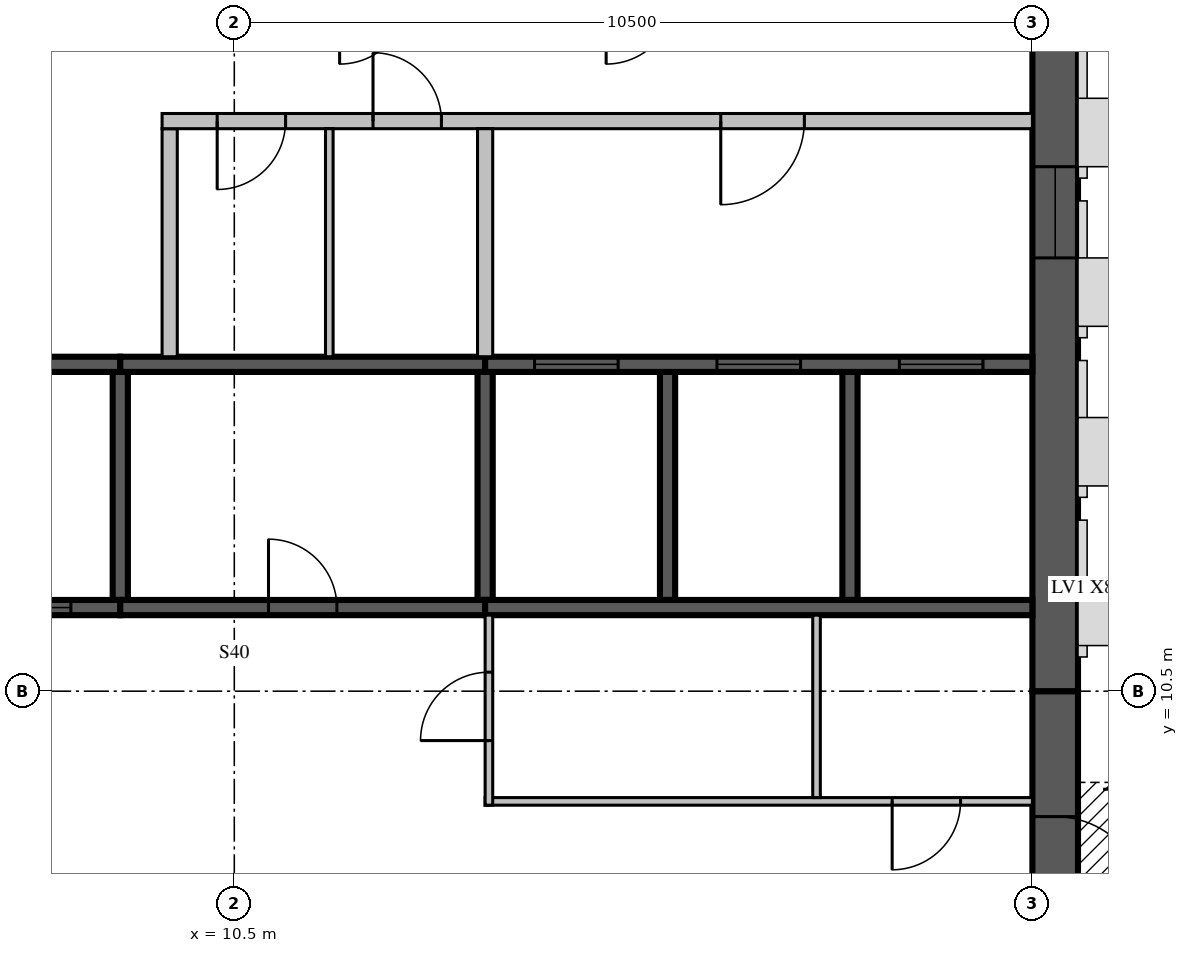
"""IFC4 building model, lengths in metres.
Left out: names, types, materials, properties, quantities, classifications, styles, units other than length and angle.
Written with IfcOpenShell. Run it as: python <this file> out.ifc"""

import sys

from ifc_helpers import new_model, si_unit, direction, frame, frame_2d, origin, place, context, subcontext, project, spatial, rectangle, extrude, source, transform, mapped, element, fill, save


model = new_model("IFC4")
c1 = context("Model", 3, precision=1e-05, world=origin(), true_north=direction((0.0, 1.0)))
c2 = subcontext(c1, "Body", "Model", "MODEL_VIEW")
j1 = project(units=[si_unit("LENGTHUNIT", "METRE"), si_unit("PLANEANGLEUNIT", "RADIAN")], contexts=[c1])
p1 = place(None, origin())
s1 = spatial("IfcSite", under=j1, at=p1, CompositionType="ELEMENT")
p2 = place(p1, origin())
s2 = spatial("IfcBuilding", under=s1, at=p2, CompositionType="ELEMENT")
p3 = place(p2, frame((0.0, 0.0, 305.5)))
s3 = spatial("IfcBuildingStorey", under=s2, at=p3, CompositionType="ELEMENT", Elevation=305.5)
m1 = source(origin(), c2, "Body", "SweptSolid", [
    extrude(rectangle(XDim=6.3, YDim=0.6, at=frame_2d((3.15, 0.0))), origin(), (0.0, 0.0, 1.0), 3.5),
])
p4 = place(p3, frame((21.3, 4.2, 0.0), z_axis=(0.0, 0.0, 1.0), x_axis=(0.0, 1.0, 0.0)))
e1 = element("IfcWall", 1, at=p4, inside=s3, PredefinedType="SHEAR", context=c2, shape_type="MappedRepresentation", body=[
    mapped(m1, transform((0.0, 0.0, 0.0), scale=1.0)),
])
m2 = source(origin(), c2, "Body", "SweptSolid", [
    extrude(rectangle(XDim=1.2, YDim=2.1, at=frame_2d((0.6, 1.05))), frame((0.0, 0.31, 0.0), z_axis=(0.0, -1.0, 0.0), x_axis=(1.0, 0.0, 0.0)), (0.0, 0.0, 1.0), 0.62),
])
p5 = place(p4, frame((3.45, 0.0, 0.0)))
e2 = element("IfcOpeningElement", 2, at=p5, cuts=e1, PredefinedType="OPENING", context=c2, shape_type="MappedRepresentation", body=[
    mapped(m2, transform((0.0, 0.0, 0.0), scale=1.0)),
])
m3 = source(origin(), c2, "Body", "SweptSolid", [
    extrude(rectangle(XDim=10.5, YDim=0.6, at=frame_2d((5.25, 0.0))), origin(), (0.0, 0.0, 1.0), 3.5),
])
p6 = place(p3, frame((21.3, 10.5, 0.0), z_axis=(0.0, 0.0, 1.0), x_axis=(0.0, 1.0, 0.0)))
e3 = element("IfcWall", 3, at=p6, inside=s3, PredefinedType="SHEAR", context=c2, shape_type="MappedRepresentation", body=[
    mapped(m3, transform((0.0, 0.0, 0.0), scale=1.0)),
])
m4 = source(origin(), c2, "Body", "SweptSolid", [
    extrude(rectangle(XDim=1.2, YDim=2.4, at=frame_2d((0.6, 1.2))), frame((0.0, 0.31, 0.0), z_axis=(0.0, -1.0, 0.0), x_axis=(1.0, 0.0, 0.0)), (0.0, 0.0, 1.0), 0.62),
])
p7 = place(p6, frame((5.7, 0.0, 0.6)))
e4 = element("IfcOpeningElement", 4, at=p7, cuts=e3, PredefinedType="OPENING", context=c2, shape_type="MappedRepresentation", body=[
    mapped(m4, transform((0.0, 0.0, 0.0), scale=1.0)),
])
m5 = source(origin(), c2, "Body", "SweptSolid", [
    extrude(rectangle(XDim=3.0, YDim=0.2, at=frame_2d((1.5, 0.0))), origin(), (0.0, 0.0, 1.0), 3.1),
])
for number, where, z_axis, x_axis in (
    (5, (9.0, 11.7, 0.0), (0.0, 0.0, 1.0), (0.0, 1.0, 0.0)),
    (6, (13.8, 11.7, 0.0), (0.0, 0.0, 1.0), (0.0, 1.0, 0.0)),
):
    element("IfcWall", number, at=place(p3, frame(where, z_axis=z_axis, x_axis=x_axis)), inside=s3, PredefinedType="SOLIDWALL", context=c2, shape_type="MappedRepresentation", body=[
        mapped(m5, transform((0.0, 0.0, 0.0), scale=1.0)),
    ])
m6 = source(origin(), c2, "Body", "SweptSolid", [
    extrude(rectangle(XDim=3.0, YDim=0.2, at=frame_2d((1.5, 0.0))), origin(), (0.0, 0.0, 1.0), 3.5),
])
for number, where, z_axis, x_axis in (
    (7, (16.2, 11.7, 0.0), (0.0, 0.0, 1.0), (0.0, 1.0, 0.0)),
    (8, (18.6, 11.7, 0.0), (0.0, 0.0, 1.0), (0.0, 1.0, 0.0)),
):
    element("IfcWall", number, at=place(p3, frame(where, z_axis=z_axis, x_axis=x_axis)), inside=s3, PredefinedType="SOLIDWALL", context=c2, shape_type="MappedRepresentation", body=[
        mapped(m6, transform((0.0, 0.0, 0.0), scale=1.0)),
    ])
m7 = source(origin(), c2, "Body", "SweptSolid", [
    extrude(rectangle(XDim=4.8, YDim=0.2, at=frame_2d((2.4, 0.0))), origin(), (0.0, 0.0, 1.0), 3.5),
])
p8 = place(p3, frame((4.2, 11.6, 0.0), z_axis=(0.0, 0.0, 1.0), x_axis=(1.0, 0.0, 0.0)))
e9 = element("IfcWall", 9, at=p8, inside=s3, PredefinedType="SOLIDWALL", context=c2, shape_type="MappedRepresentation", body=[
    mapped(m7, transform((0.0, 0.0, 0.0), scale=1.0)),
])
m8 = source(origin(), c2, "Body", "SweptSolid", [
    extrude(rectangle(XDim=1.1, YDim=2.1, at=frame_2d((0.55, 1.05))), frame((0.0, 0.11, 0.0), z_axis=(0.0, -1.0, 0.0), x_axis=(1.0, 0.0, 0.0)), (0.0, 0.0, 1.0), 0.22),
])
p9 = place(p8, frame((0.65, 0.0, 0.0)))
e10 = element("IfcOpeningElement", 10, at=p9, cuts=e9, PredefinedType="OPENING", context=c2, shape_type="MappedRepresentation", body=[
    mapped(m8, transform((0.0, 0.0, 0.0), scale=1.0)),
])
p10 = place(p8, frame((3.05, 0.0, 0.0)))
e11 = element("IfcOpeningElement", 11, at=p10, cuts=e9, PredefinedType="OPENING", context=c2, shape_type="MappedRepresentation", body=[
    mapped(m8, transform((0.0, 0.0, 0.0), scale=1.0)),
])
m9 = source(origin(), c2, "Body", "SweptSolid", [
    extrude(rectangle(XDim=4.8, YDim=0.2, at=frame_2d((2.4, 0.0))), origin(), (0.0, 0.0, 1.0), 3.1),
])
p11 = place(p3, frame((9.0, 11.6, 0.0), z_axis=(0.0, 0.0, 1.0), x_axis=(1.0, 0.0, 0.0)))
e12 = element("IfcWall", 12, at=p11, inside=s3, PredefinedType="SOLIDWALL", context=c2, shape_type="MappedRepresentation", body=[
    mapped(m9, transform((0.0, 0.0, 0.0), scale=1.0)),
])
m10 = source(origin(), c2, "Body", "SweptSolid", [
    extrude(rectangle(XDim=0.9, YDim=2.1, at=frame_2d((0.45, 1.05))), frame((0.0, 0.11, 0.0), z_axis=(0.0, -1.0, 0.0), x_axis=(1.0, 0.0, 0.0)), (0.0, 0.0, 1.0), 0.22),
])
p12 = place(p11, frame((1.95, 0.0, 0.0)))
e13 = element("IfcOpeningElement", 13, at=p12, cuts=e12, PredefinedType="OPENING", context=c2, shape_type="MappedRepresentation", body=[
    mapped(m10, transform((0.0, 0.0, 0.0), scale=1.0)),
])
m11 = source(origin(), c2, "Body", "SweptSolid", [
    extrude(rectangle(XDim=7.2, YDim=0.2, at=frame_2d((3.6, 0.0))), origin(), (0.0, 0.0, 1.0), 3.5),
])
p13 = place(p3, frame((13.8, 11.6, 0.0), z_axis=(0.0, 0.0, 1.0), x_axis=(1.0, 0.0, 0.0)))
e14 = element("IfcWall", 14, at=p13, inside=s3, PredefinedType="SOLIDWALL", context=c2, shape_type="MappedRepresentation", body=[
    mapped(m11, transform((0.0, 0.0, 0.0), scale=1.0)),
])
p14 = place(p3, frame((4.2, 14.8, 0.0), z_axis=(0.0, 0.0, 1.0), x_axis=(1.0, 0.0, 0.0)))
e15 = element("IfcWall", 15, at=p14, inside=s3, PredefinedType="SOLIDWALL", context=c2, shape_type="MappedRepresentation", body=[
    mapped(m7, transform((0.0, 0.0, 0.0), scale=1.0)),
])
p15 = place(p3, frame((9.0, 14.8, 0.0), z_axis=(0.0, 0.0, 1.0), x_axis=(1.0, 0.0, 0.0)))
e16 = element("IfcWall", 16, at=p15, inside=s3, PredefinedType="SOLIDWALL", context=c2, shape_type="MappedRepresentation", body=[
    mapped(m9, transform((0.0, 0.0, 0.0), scale=1.0)),
])
p16 = place(p3, frame((13.8, 14.8, 0.0), z_axis=(0.0, 0.0, 1.0), x_axis=(1.0, 0.0, 0.0)))
e17 = element("IfcWall", 17, at=p16, inside=s3, PredefinedType="SOLIDWALL", context=c2, shape_type="MappedRepresentation", body=[
    mapped(m11, transform((0.0, 0.0, 0.0), scale=1.0)),
])
p17 = place(p16, frame((0.65, 0.0, 0.0)))
e18 = element("IfcOpeningElement", 18, at=p17, cuts=e17, PredefinedType="OPENING", context=c2, shape_type="MappedRepresentation", body=[
    mapped(m8, transform((0.0, 0.0, 0.0), scale=1.0)),
])
p18 = place(p16, frame((3.05, 0.0, 0.0)))
e19 = element("IfcOpeningElement", 19, at=p18, cuts=e17, PredefinedType="OPENING", context=c2, shape_type="MappedRepresentation", body=[
    mapped(m8, transform((0.0, 0.0, 0.0), scale=1.0)),
])
p19 = place(p16, frame((5.45, 0.0, 0.0)))
e20 = element("IfcOpeningElement", 20, at=p19, cuts=e17, PredefinedType="OPENING", context=c2, shape_type="MappedRepresentation", body=[
    mapped(m8, transform((0.0, 0.0, 0.0), scale=1.0)),
])
m12 = source(origin(), c2, "Body", "SweptSolid", [
    extrude(rectangle(XDim=3.0, YDim=0.2, at=frame_2d((1.5, 0.0))), origin(), (0.0, 0.0, 1.0), 3.1),
])
p20 = place(p3, frame((9.65, 14.9, 0.0), z_axis=(0.0, 0.0, 1.0), x_axis=(0.0, 1.0, 0.0)))
e21 = element("IfcWall", 21, at=p20, inside=s3, PredefinedType="PARTITIONING", context=c2, shape_type="MappedRepresentation", body=[
    mapped(m12, transform((0.0, 0.0, 0.0), scale=1.0)),
])
m13 = source(origin(), c2, "Body", "SweptSolid", [
    extrude(rectangle(XDim=11.45, YDim=0.2, at=frame_2d((5.725, 0.0))), origin(), (0.0, 0.0, 1.0), 3.1),
])
p21 = place(p3, frame((9.55, 18.0, 0.0), z_axis=(0.0, 0.0, 1.0), x_axis=(1.0, 0.0, 0.0)))
e22 = element("IfcWall", 22, at=p21, inside=s3, PredefinedType="PARTITIONING", context=c2, shape_type="MappedRepresentation", body=[
    mapped(m13, transform((0.0, 0.0, 0.0), scale=1.0)),
])
p22 = place(p21, frame((0.725, 0.0, 0.0)))
e23 = element("IfcOpeningElement", 23, at=p22, cuts=e22, PredefinedType="OPENING", context=c2, shape_type="MappedRepresentation", body=[
    mapped(m10, transform((0.0, 0.0, 0.0), scale=1.0)),
])
p23 = place(p21, frame((2.775, 0.0, 0.0)))
e24 = element("IfcOpeningElement", 24, at=p23, cuts=e22, PredefinedType="OPENING", context=c2, shape_type="MappedRepresentation", body=[
    mapped(m10, transform((0.0, 0.0, 0.0), scale=1.0)),
])
p24 = place(p21, frame((7.35, 0.0, 0.0)))
e25 = element("IfcOpeningElement", 25, at=p24, cuts=e22, PredefinedType="OPENING", context=c2, shape_type="MappedRepresentation", body=[
    mapped(m8, transform((0.0, 0.0, 0.0), scale=1.0)),
])
m14 = source(origin(), c2, "Body", "SweptSolid", [
    extrude(rectangle(XDim=7.2, YDim=0.1, at=frame_2d((3.6, 0.0))), origin(), (0.0, 0.0, 1.0), 3.1),
])
p25 = place(p3, frame((13.8, 9.05, 0.0), z_axis=(0.0, 0.0, 1.0), x_axis=(1.0, 0.0, 0.0)))
e26 = element("IfcWall", 26, at=p25, inside=s3, PredefinedType="PARTITIONING", context=c2, shape_type="MappedRepresentation", body=[
    mapped(m14, transform((0.0, 0.0, 0.0), scale=1.0)),
])
m15 = source(origin(), c2, "Body", "SweptSolid", [
    extrude(rectangle(XDim=0.9, YDim=2.1, at=frame_2d((0.45, 1.05))), frame((0.0, 0.06, 0.0), z_axis=(0.0, -1.0, 0.0), x_axis=(1.0, 0.0, 0.0)), (0.0, 0.0, 1.0), 0.12),
])
p26 = place(p25, frame((5.355, 0.0, 0.0)))
e27 = element("IfcOpeningElement", 27, at=p26, cuts=e26, PredefinedType="OPENING", context=c2, shape_type="MappedRepresentation", body=[
    mapped(m15, transform((0.0, 0.0, 0.0), scale=1.0)),
])
m16 = source(origin(), c2, "Body", "SweptSolid", [
    extrude(rectangle(XDim=2.5, YDim=0.1, at=frame_2d((1.25, 0.0))), origin(), (0.0, 0.0, 1.0), 3.1),
])
p27 = place(p3, frame((13.85, 9.0, 0.0), z_axis=(0.0, 0.0, 1.0), x_axis=(0.0, 1.0, 0.0)))
e28 = element("IfcWall", 28, at=p27, inside=s3, PredefinedType="PARTITIONING", context=c2, shape_type="MappedRepresentation", body=[
    mapped(m16, transform((0.0, 0.0, 0.0), scale=1.0)),
])
p28 = place(p27, frame((0.85, 0.0, 0.0)))
e29 = element("IfcOpeningElement", 29, at=p28, cuts=e28, PredefinedType="OPENING", context=c2, shape_type="MappedRepresentation", body=[
    mapped(m15, transform((0.0, 0.0, 0.0), scale=1.0)),
])
m17 = source(origin(), c2, "Body", "SweptSolid", [
    extrude(rectangle(XDim=2.4, YDim=0.1, at=frame_2d((1.2, 0.0))), origin(), (0.0, 0.0, 1.0), 3.1),
])
p29 = place(p3, frame((18.16, 9.1, 0.0), z_axis=(0.0, 0.0, 1.0), x_axis=(0.0, 1.0, 0.0)))
e30 = element("IfcWall", 30, at=p29, inside=s3, PredefinedType="PARTITIONING", context=c2, shape_type="MappedRepresentation", body=[
    mapped(m17, transform((0.0, 0.0, 0.0), scale=1.0)),
])
p30 = place(p3, frame((13.8, 14.9, 0.0), z_axis=(0.0, 0.0, 1.0), x_axis=(0.0, 1.0, 0.0)))
e31 = element("IfcWall", 31, at=p30, inside=s3, PredefinedType="PARTITIONING", context=c2, shape_type="MappedRepresentation", body=[
    mapped(m12, transform((0.0, 0.0, 0.0), scale=1.0)),
])
m18 = source(origin(), c2, "Body", "SweptSolid", [
    extrude(rectangle(XDim=3.0, YDim=0.1, at=frame_2d((1.5, 0.0))), origin(), (0.0, 0.0, 1.0), 3.1),
])
p31 = place(p3, frame((11.75, 14.9, 0.0), z_axis=(0.0, 0.0, 1.0), x_axis=(0.0, 1.0, 0.0)))
e32 = element("IfcWall", 32, at=p31, inside=s3, PredefinedType="PARTITIONING", context=c2, shape_type="MappedRepresentation", body=[
    mapped(m18, transform((0.0, 0.0, 0.0), scale=1.0)),
])
m19 = source(origin(), c2, "Body", "SweptSolid", [
    extrude(rectangle(XDim=1.1, YDim=2.1, at=frame_2d((0.55, 1.05))), frame((0.0, 0.025, 0.0), z_axis=(0.0, -1.0, 0.0), x_axis=(1.0, 0.0, 0.0)), (0.0, 0.0, 1.0), 0.05),
])
p32 = place(p10, origin())
e33 = element("IfcDoor", 33, at=p32, inside=s3, OperationType="SLIDING_TO_LEFT", PredefinedType="DOOR", context=c2, shape_type="MappedRepresentation", body=[
    mapped(m19, transform((0.0, 0.0, 0.0), scale=1.0)),
])
fill(e11, e33)
m20 = source(origin(), c2, "Body", "SweptSolid", [
    extrude(rectangle(XDim=0.9, YDim=2.1, at=frame_2d((0.45, 1.05))), frame((0.0, 0.025, 0.0), z_axis=(0.0, -1.0, 0.0), x_axis=(1.0, 0.0, 0.0)), (0.0, 0.0, 1.0), 0.05),
])
p33 = place(p12, origin())
e34 = element("IfcDoor", 34, at=p33, inside=s3, OperationType="SINGLE_SWING_LEFT", PredefinedType="DOOR", context=c2, shape_type="MappedRepresentation", body=[
    mapped(m20, transform((0.0, 0.0, 0.0), scale=1.0)),
])
fill(e13, e34)
p34 = place(p17, origin())
e35 = element("IfcDoor", 35, at=p34, inside=s3, OperationType="SLIDING_TO_LEFT", PredefinedType="DOOR", context=c2, shape_type="MappedRepresentation", body=[
    mapped(m19, transform((0.0, 0.0, 0.0), scale=1.0)),
])
fill(e18, e35)
p35 = place(p18, origin())
e36 = element("IfcDoor", 36, at=p35, inside=s3, OperationType="SLIDING_TO_LEFT", PredefinedType="DOOR", context=c2, shape_type="MappedRepresentation", body=[
    mapped(m19, transform((0.0, 0.0, 0.0), scale=1.0)),
])
fill(e19, e36)
p36 = place(p19, origin())
e37 = element("IfcDoor", 37, at=p36, inside=s3, OperationType="SLIDING_TO_LEFT", PredefinedType="DOOR", context=c2, shape_type="MappedRepresentation", body=[
    mapped(m19, transform((0.0, 0.0, 0.0), scale=1.0)),
])
fill(e20, e37)
p37 = place(p22, origin())
e38 = element("IfcDoor", 38, at=p37, inside=s3, OperationType="SINGLE_SWING_RIGHT", PredefinedType="DOOR", context=c2, shape_type="MappedRepresentation", body=[
    mapped(m20, transform((0.0, 0.0, 0.0), scale=1.0)),
])
fill(e23, e38)
p38 = place(p23, origin())
e39 = element("IfcDoor", 39, at=p38, inside=s3, OperationType="SINGLE_SWING_LEFT", PredefinedType="DOOR", context=c2, shape_type="MappedRepresentation", body=[
    mapped(m20, transform((0.0, 0.0, 0.0), scale=1.0)),
])
fill(e24, e39)
p39 = place(p24, origin())
e40 = element("IfcDoor", 40, at=p39, inside=s3, OperationType="SINGLE_SWING_RIGHT", PredefinedType="DOOR", context=c2, shape_type="MappedRepresentation", body=[
    mapped(m19, transform((0.0, 0.0, 0.0), scale=1.0)),
])
fill(e25, e40)
p40 = place(p26, origin())
e41 = element("IfcDoor", 41, at=p40, inside=s3, OperationType="SINGLE_SWING_RIGHT", PredefinedType="DOOR", context=c2, shape_type="MappedRepresentation", body=[
    mapped(m20, transform((0.0, 0.0, 0.0), scale=1.0)),
])
fill(e27, e41)
p41 = place(p28, origin())
e42 = element("IfcDoor", 42, at=p41, inside=s3, OperationType="SINGLE_SWING_LEFT", PredefinedType="DOOR", context=c2, shape_type="MappedRepresentation", body=[
    mapped(m20, transform((0.0, 0.0, 0.0), scale=1.0)),
])
fill(e29, e42)
m21 = source(origin(), c2, "Body", "SweptSolid", [
    extrude(rectangle(XDim=1.2, YDim=2.1, at=frame_2d((0.6, 1.05))), frame((0.0, 0.025, 0.0), z_axis=(0.0, -1.0, 0.0), x_axis=(1.0, 0.0, 0.0)), (0.0, 0.0, 1.0), 0.05),
])
p42 = place(p5, origin())
e43 = element("IfcDoor", 43, at=p42, inside=s3, OperationType="SINGLE_SWING_RIGHT", PredefinedType="DOOR", context=c2, shape_type="MappedRepresentation", body=[
    mapped(m21, transform((0.0, 0.0, 0.0), scale=1.0)),
])
fill(e2, e43)
m22 = source(origin(), c2, "Body", "SweptSolid", [
    extrude(rectangle(XDim=1.2, YDim=2.4, at=frame_2d((0.6, 1.2))), frame((0.0, 0.03, 0.0), z_axis=(0.0, -1.0, 0.0), x_axis=(1.0, 0.0, 0.0)), (0.0, 0.0, 1.0), 0.06),
])
p43 = place(p7, origin())
e44 = element("IfcWindow", 44, at=p43, inside=s3, PartitioningType="SINGLE_PANEL", PredefinedType="WINDOW", context=c2, shape_type="MappedRepresentation", body=[
    mapped(m22, transform((0.0, 0.0, 0.0), scale=1.0)),
])
fill(e4, e44)
save(model, sys.argv[1])
